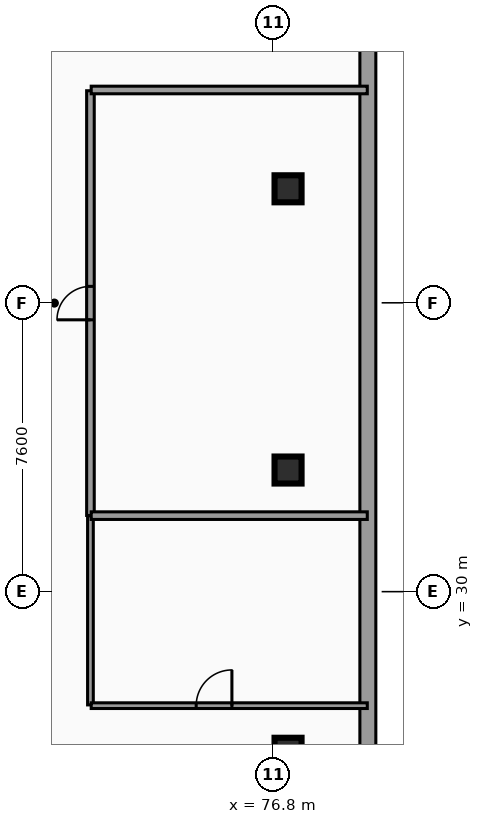
"""IFC4 building model, lengths in metres.
Left out: names, types, materials, properties, quantities, classifications, styles, units other than length and angle.
Written with IfcOpenShell. Run it as: python <this file> out.ifc"""

import sys

from ifc_helpers import new_model, si_unit, direction, frame, frame_2d, origin, origin_2d, place, context, subcontext, project, spatial, rectangle, hollow_circle, extrude, element, fill, save


model = new_model("IFC4")
c1 = context("Model", 3, precision=1e-05, world=origin(), true_north=direction((0.0, 1.0)))
c2 = subcontext(c1, "Body", "Model", "MODEL_VIEW")
j1 = project(units=[si_unit("LENGTHUNIT", "METRE"), si_unit("PLANEANGLEUNIT", "RADIAN")], contexts=[c1])
p1 = place(None, origin())
s1 = spatial("IfcSite", under=j1, at=p1, CompositionType="ELEMENT")
p2 = place(p1, origin())
s2 = spatial("IfcBuilding", under=s1, at=p2, CompositionType="ELEMENT")
p3 = place(p2, frame((0.0, 0.0, -4.08)))
s3 = spatial("IfcBuildingStorey", under=s2, at=p3, CompositionType="ELEMENT", Elevation=-4.08)
p4 = place(p3, frame((79.3, 9.0, 0.0), z_axis=(0.0, 0.0, 1.0), x_axis=(0.0, 1.0, 0.0)))
e1 = element("IfcWall", 1, at=p4, inside=s3, PredefinedType="SOLIDWALL", context=c2, shape_type="SweptSolid", body=[
    extrude(rectangle(XDim=39.0, YDim=0.42, at=frame_2d((19.5, 0.0))), origin(), (0.0, 0.0, 1.0), 3.76),
])
for number, where, z_axis, x_axis in (
    (2, (77.2, 33.2, 0.0), (0.0, 0.0, 1.0), (1.0, 0.0, 0.0)),
    (3, (77.2, 40.6, 0.0), (0.0, 0.0, 1.0), (1.0, 0.0, 0.0)),
    (4, (77.2, 25.8, 0.0), (0.0, 0.0, 1.0), (1.0, 0.0, 0.0)),
):
    element("IfcColumn", number, at=place(p3, frame(where, z_axis=z_axis, x_axis=x_axis)), inside=s3, PredefinedType="COLUMN", context=c2, shape_type="SweptSolid", body=[
        extrude(hollow_circle(Radius=0.355, WallThickness=0.03, at=origin_2d()), origin(), (0.0, 0.0, 1.0), 3.76),
    ])
p5 = place(p3, frame((72.0, 27.02, 0.0), z_axis=(0.0, 0.0, 1.0), x_axis=(0.0, 1.0, 0.0)))
e5 = element("IfcWall", 5, at=p5, inside=s3, PredefinedType="PARTITIONING", context=c2, shape_type="SweptSolid", body=[
    extrude(rectangle(XDim=4.975, YDim=0.15, at=frame_2d((2.488, 0.0))), origin(), (0.0, 0.0, 1.0), 2.717),
])
p6 = place(p3, frame((72.02, 27.0, 0.0), z_axis=(0.0, 0.0, 1.0), x_axis=(1.0, 0.0, 0.0)))
e6 = element("IfcWall", 6, at=p6, inside=s3, PredefinedType="PARTITIONING", context=c2, shape_type="SweptSolid", body=[
    extrude(rectangle(XDim=7.265, YDim=0.15, at=frame_2d((3.632, 0.0))), origin(), (0.0, 0.0, 1.0), 2.717),
])
p7 = place(p6, frame((2.762, 0.0, 0.0)))
e7 = element("IfcOpeningElement", 7, at=p7, cuts=e6, PredefinedType="OPENING", context=c2, shape_type="SweptSolid", body=[
    extrude(rectangle(XDim=0.94, YDim=2.05, at=frame_2d((0.47, 1.025))), frame((0.0, 0.085, 0.0), z_axis=(0.0, -1.0, 0.0), x_axis=(1.0, 0.0, 0.0)), (0.0, 0.0, 1.0), 0.17),
])
p8 = place(p3, frame((72.0, 32.005, 0.0), z_axis=(0.0, 0.0, 1.0), x_axis=(0.0, 1.0, 0.0)))
e8 = element("IfcWall", 8, at=p8, inside=s3, PredefinedType="PARTITIONING", context=c2, shape_type="SweptSolid", body=[
    extrude(rectangle(XDim=11.175, YDim=0.2, at=frame_2d((5.587, 0.0))), origin(), (0.0, 0.0, 1.0), 2.717),
])
p9 = place(p8, frame((5.147, 0.0, 0.0)))
e9 = element("IfcOpeningElement", 9, at=p9, cuts=e8, PredefinedType="OPENING", context=c2, shape_type="SweptSolid", body=[
    extrude(rectangle(XDim=0.88, YDim=2.05, at=frame_2d((0.44, 1.025))), frame((0.0, 0.11, 0.0), z_axis=(0.0, -1.0, 0.0), x_axis=(1.0, 0.0, 0.0)), (0.0, 0.0, 1.0), 0.22),
])
for number, where, z_axis, x_axis in (
    (10, (72.02, 43.2, 0.0), (0.0, 0.0, 1.0), (1.0, 0.0, 0.0)),
    (11, (72.02, 32.0, 0.0), (0.0, 0.0, 1.0), (1.0, 0.0, 0.0)),
):
    element("IfcWall", number, at=place(p3, frame(where, z_axis=z_axis, x_axis=x_axis)), inside=s3, PredefinedType="PARTITIONING", context=c2, shape_type="SweptSolid", body=[
        extrude(rectangle(XDim=7.265, YDim=0.2, at=frame_2d((3.632, 0.0))), origin(), (0.0, 0.0, 1.0), 2.717),
    ])
p10 = place(p7, origin())
e12 = element("IfcDoor", 12, at=p10, inside=s3, OperationType="SINGLE_SWING_RIGHT", PredefinedType="DOOR", context=c2, shape_type="SweptSolid", body=[
    extrude(rectangle(XDim=0.94, YDim=2.05, at=frame_2d((0.47, 1.025))), frame((0.0, 0.025, 0.0), z_axis=(0.0, -1.0, 0.0), x_axis=(1.0, 0.0, 0.0)), (0.0, 0.0, 1.0), 0.05),
])
fill(e7, e12)
p11 = place(p9, origin())
e13 = element("IfcDoor", 13, at=p11, inside=s3, OperationType="SINGLE_SWING_LEFT", PredefinedType="DOOR", context=c2, shape_type="SweptSolid", body=[
    extrude(rectangle(XDim=0.88, YDim=2.05, at=frame_2d((0.44, 1.025))), frame((0.0, 0.025, 0.0), z_axis=(0.0, -1.0, 0.0), x_axis=(1.0, 0.0, 0.0)), (0.0, 0.0, 1.0), 0.05),
])
fill(e9, e13)
save(model, sys.argv[1])
